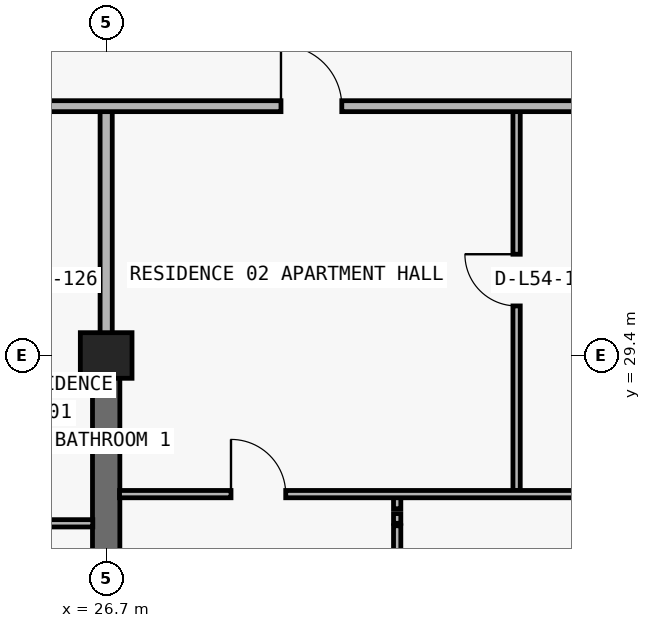
"""IFC4 building model, lengths in metres.
Left out: names, types, materials, properties, quantities, classifications, styles, units other than length and angle.
Written with IfcOpenShell. Run it as: python <this file> out.ifc"""

import sys

from ifc_helpers import new_model, si_unit, direction, frame, frame_2d, origin, origin_2d, place, context, subcontext, project, spatial, rectangle, extrude, element, fill, save


model = new_model("IFC4")
c1 = context("Model", 3, precision=1e-05, world=origin(), true_north=direction((0.0, 1.0)))
c2 = subcontext(c1, "Body", "Model", "MODEL_VIEW")
j1 = project(units=[si_unit("LENGTHUNIT", "METRE"), si_unit("PLANEANGLEUNIT", "RADIAN")], contexts=[c1])
p1 = place(None, origin())
s1 = spatial("IfcSite", under=j1, at=p1, CompositionType="ELEMENT")
p2 = place(p1, origin())
s2 = spatial("IfcBuilding", under=s1, at=p2, CompositionType="ELEMENT")
p3 = place(p2, frame((0.0, 0.0, 195.0)))
s3 = spatial("IfcBuildingStorey", under=s2, at=p3, CompositionType="ELEMENT", Elevation=195.0)
p4 = place(p3, frame((26.7, 29.4, 0.0), z_axis=(0.0, 0.0, 1.0), x_axis=(1.0, 0.0, 0.0)))
e1 = element("IfcColumn", 1, at=p4, inside=s3, PredefinedType="COLUMN", context=c2, shape_type="SweptSolid", body=[
    extrude(rectangle(XDim=0.85, YDim=0.75, at=origin_2d()), origin(), (0.0, 0.0, 1.0), 3.05),
])
p5 = place(p3, frame((26.7, 20.8, 0.0), z_axis=(0.0, 0.0, 1.0), x_axis=(0.0, 1.0, 0.0)))
e2 = element("IfcWall", 2, at=p5, inside=s3, PredefinedType="SHEAR", context=c2, shape_type="SweptSolid", body=[
    extrude(rectangle(XDim=8.6, YDim=0.45, at=frame_2d((4.3, 0.0))), origin(), (0.0, 0.0, 1.0), 3.05),
])
p6 = place(p3, frame((26.7, 29.405, 0.0), z_axis=(0.0, 0.0, 1.0), x_axis=(0.0, 1.0, 0.0)))
e3 = element("IfcWall", 3, at=p6, inside=s3, PredefinedType="PARTITIONING", context=c2, shape_type="SweptSolid", body=[
    extrude(rectangle(XDim=4.095, YDim=0.2, at=frame_2d((2.047, 0.0))), origin(), (0.0, 0.0, 1.0), 2.335),
])
p7 = place(p3, frame((31.486, 22.24, 0.0), z_axis=(0.0, 0.0, 1.0), x_axis=(0.0, 1.0, 0.0)))
e4 = element("IfcWall", 4, at=p7, inside=s3, PredefinedType="PARTITIONING", context=c2, shape_type="SweptSolid", body=[
    extrude(rectangle(XDim=4.36, YDim=0.12, at=frame_2d((2.18, 0.0))), origin(), (0.0, 0.0, 1.0), 3.05),
])
p8 = place(p7, frame((1.73, 0.0, 0.0)))
e5 = element("IfcOpeningElement", 5, at=p8, cuts=e4, PredefinedType="OPENING", context=c2, shape_type="SweptSolid", body=[
    extrude(rectangle(XDim=0.9, YDim=2.15, at=frame_2d((0.45, 1.075))), frame((0.0, 0.07, 0.0), z_axis=(0.0, -1.0, 0.0), x_axis=(1.0, 0.0, 0.0)), (0.0, 0.0, 1.0), 0.14),
])
p9 = place(p3, frame((31.486, 26.64, 0.0), z_axis=(0.0, 0.0, 1.0), x_axis=(0.0, 1.0, 0.0)))
e6 = element("IfcWall", 6, at=p9, inside=s3, PredefinedType="PARTITIONING", context=c2, shape_type="SweptSolid", body=[
    extrude(rectangle(XDim=0.16, YDim=0.12, at=frame_2d((0.08, 0.0))), origin(), (0.0, 0.0, 1.0), 3.05),
])
p10 = place(p3, frame((31.486, 26.88, 0.0), z_axis=(0.0, 0.0, 1.0), x_axis=(0.0, 1.0, 0.0)))
e7 = element("IfcWall", 7, at=p10, inside=s3, PredefinedType="PARTITIONING", context=c2, shape_type="SweptSolid", body=[
    extrude(rectangle(XDim=0.24, YDim=0.12, at=frame_2d((0.12, 0.0))), origin(), (0.0, 0.0, 1.0), 3.05),
])
p11 = place(p3, frame((33.45, 27.18, 0.0), z_axis=(0.0, 0.0, 1.0), x_axis=(0.0, 1.0, 0.0)))
e8 = element("IfcWall", 8, at=p11, inside=s3, PredefinedType="PARTITIONING", context=c2, shape_type="SweptSolid", body=[
    extrude(rectangle(XDim=6.32, YDim=0.12, at=frame_2d((3.16, 0.0))), origin(), (0.0, 0.0, 1.0), 3.05),
])
p12 = place(p11, frame((3.035, 0.0, 0.0)))
e9 = element("IfcOpeningElement", 9, at=p12, cuts=e8, PredefinedType="OPENING", context=c2, shape_type="SweptSolid", body=[
    extrude(rectangle(XDim=0.85, YDim=2.1, at=frame_2d((0.425, 1.05))), frame((0.0, 0.07, 0.0), z_axis=(0.0, -1.0, 0.0), x_axis=(1.0, 0.0, 0.0)), (0.0, 0.0, 1.0), 0.14),
])
p13 = place(p3, frame((18.3, 26.64, 0.0), z_axis=(0.0, 0.0, 1.0), x_axis=(1.0, 0.0, 0.0)))
e10 = element("IfcWall", 10, at=p13, inside=s3, PredefinedType="PARTITIONING", context=c2, shape_type="SweptSolid", body=[
    extrude(rectangle(XDim=8.18, YDim=0.12, at=frame_2d((4.09, 0.0))), origin(), (0.0, 0.0, 1.0), 3.05),
])
p14 = place(p13, frame((3.0, 0.0, 0.0)))
e11 = element("IfcOpeningElement", 11, at=p14, cuts=e10, PredefinedType="OPENING", context=c2, shape_type="SweptSolid", body=[
    extrude(rectangle(XDim=0.9, YDim=2.15, at=frame_2d((0.45, 1.075))), frame((0.0, 0.07, 0.0), z_axis=(0.0, -1.0, 0.0), x_axis=(1.0, 0.0, 0.0)), (0.0, 0.0, 1.0), 0.14),
])
p15 = place(p3, frame((26.92, 27.12, 0.0), z_axis=(0.0, 0.0, 1.0), x_axis=(1.0, 0.0, 0.0)))
e12 = element("IfcWall", 12, at=p15, inside=s3, PredefinedType="PARTITIONING", context=c2, shape_type="SweptSolid", body=[
    extrude(rectangle(XDim=8.18, YDim=0.12, at=frame_2d((4.09, 0.0))), origin(), (0.0, 0.0, 1.0), 3.05),
])
p16 = place(p15, frame((1.833, 0.0, 0.0)))
e13 = element("IfcOpeningElement", 13, at=p16, cuts=e12, PredefinedType="OPENING", context=c2, shape_type="SweptSolid", body=[
    extrude(rectangle(XDim=0.9, YDim=2.15, at=frame_2d((0.45, 1.075))), frame((0.0, 0.07, 0.0), z_axis=(0.0, -1.0, 0.0), x_axis=(1.0, 0.0, 0.0)), (0.0, 0.0, 1.0), 0.14),
])
p17 = place(p3, frame((10.105, 33.5, 0.0), z_axis=(0.0, 0.0, 1.0), x_axis=(1.0, 0.0, 0.0)))
e14 = element("IfcWall", 14, at=p17, inside=s3, PredefinedType="PARTITIONING", context=c2, shape_type="SweptSolid", body=[
    extrude(rectangle(XDim=57.595, YDim=0.18, at=frame_2d((28.797, 0.0))), origin(), (0.0, 0.0, 1.0), 3.05),
])
p18 = place(p17, frame((2.824, 0.0, 0.0)))
e15 = element("IfcOpeningElement", 15, at=p18, cuts=e14, PredefinedType="OPENING", context=c2, shape_type="SweptSolid", body=[
    extrude(rectangle(XDim=1.0, YDim=2.2, at=frame_2d((0.5, 1.1))), frame((0.0, 0.1, 0.0), z_axis=(0.0, -1.0, 0.0), x_axis=(1.0, 0.0, 0.0)), (0.0, 0.0, 1.0), 0.2),
])
p19 = place(p17, frame((19.47, 0.0, 0.0)))
e16 = element("IfcOpeningElement", 16, at=p19, cuts=e14, PredefinedType="OPENING", context=c2, shape_type="SweptSolid", body=[
    extrude(rectangle(XDim=1.0, YDim=2.2, at=frame_2d((0.5, 1.1))), frame((0.0, 0.1, 0.0), z_axis=(0.0, -1.0, 0.0), x_axis=(1.0, 0.0, 0.0)), (0.0, 0.0, 1.0), 0.2),
])
p20 = place(p17, frame((27.527, 0.0, 0.0)))
e17 = element("IfcOpeningElement", 17, at=p20, cuts=e14, PredefinedType="OPENING", context=c2, shape_type="SweptSolid", body=[
    extrude(rectangle(XDim=1.0, YDim=2.2, at=frame_2d((0.5, 1.1))), frame((0.0, 0.1, 0.0), z_axis=(0.0, -1.0, 0.0), x_axis=(1.0, 0.0, 0.0)), (0.0, 0.0, 1.0), 0.2),
])
p21 = place(p17, frame((43.87, 0.0, 0.0)))
e18 = element("IfcOpeningElement", 18, at=p21, cuts=e14, PredefinedType="OPENING", context=c2, shape_type="SweptSolid", body=[
    extrude(rectangle(XDim=1.0, YDim=2.2, at=frame_2d((0.5, 1.1))), frame((0.0, 0.1, 0.0), z_axis=(0.0, -1.0, 0.0), x_axis=(1.0, 0.0, 0.0)), (0.0, 0.0, 1.0), 0.2),
])
p22 = place(p17, frame((52.17, 0.0, 0.0)))
e19 = element("IfcOpeningElement", 19, at=p22, cuts=e14, PredefinedType="OPENING", context=c2, shape_type="SweptSolid", body=[
    extrude(rectangle(XDim=1.0, YDim=2.2, at=frame_2d((0.5, 1.1))), frame((0.0, 0.1, 0.0), z_axis=(0.0, -1.0, 0.0), x_axis=(1.0, 0.0, 0.0)), (0.0, 0.0, 1.0), 0.2),
])
p23 = place(p19, origin())
e20 = element("IfcDoor", 20, at=p23, inside=s3, OperationType="SINGLE_SWING_LEFT", PredefinedType="DOOR", context=c2, shape_type="SweptSolid", body=[
    extrude(rectangle(XDim=1.0, YDim=2.2, at=frame_2d((0.5, 1.1))), frame((0.0, 0.025, 0.0), z_axis=(0.0, -1.0, 0.0), x_axis=(1.0, 0.0, 0.0)), (0.0, 0.0, 1.0), 0.05),
])
fill(e16, e20)
p24 = place(p12, origin())
e21 = element("IfcDoor", 21, at=p24, inside=s3, OperationType="SINGLE_SWING_RIGHT", PredefinedType="DOOR", context=c2, shape_type="SweptSolid", body=[
    extrude(rectangle(XDim=0.85, YDim=2.1, at=frame_2d((0.425, 1.05))), frame((0.0, 0.025, 0.0), z_axis=(0.0, -1.0, 0.0), x_axis=(1.0, 0.0, 0.0)), (0.0, 0.0, 1.0), 0.05),
])
fill(e9, e21)
p25 = place(p16, origin())
e22 = element("IfcDoor", 22, at=p25, inside=s3, OperationType="SINGLE_SWING_LEFT", PredefinedType="DOOR", context=c2, shape_type="SweptSolid", body=[
    extrude(rectangle(XDim=0.9, YDim=2.15, at=frame_2d((0.45, 1.075))), frame((0.0, 0.025, 0.0), z_axis=(0.0, -1.0, 0.0), x_axis=(1.0, 0.0, 0.0)), (0.0, 0.0, 1.0), 0.05),
])
fill(e13, e22)
save(model, sys.argv[1])
